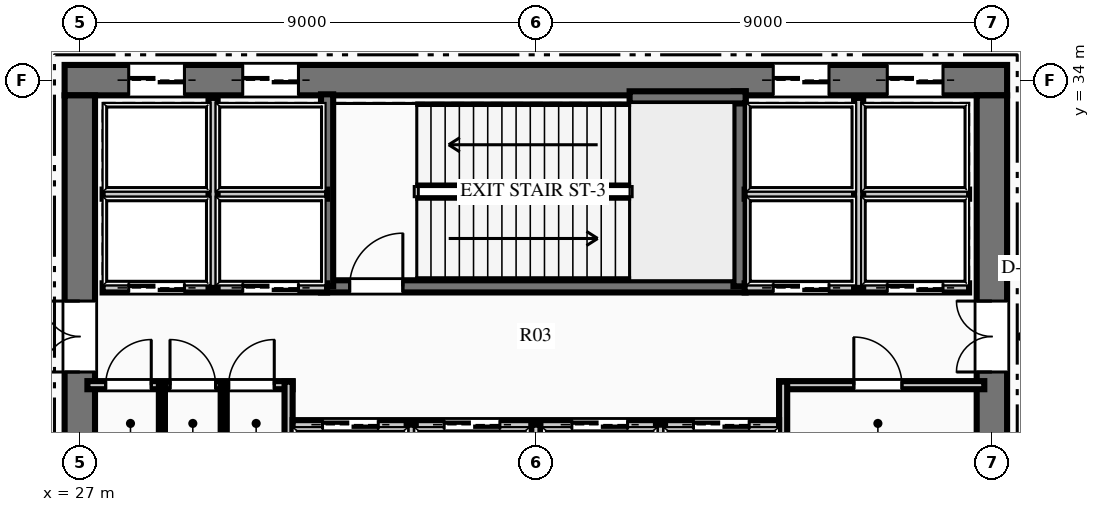
"""IFC4 building model, lengths in metres.
Left out: names, types, materials, properties, quantities, classifications, styles, units other than length and angle.
Written with IfcOpenShell. Run it as: python <this file> out.ifc"""

import sys

from ifc_helpers import new_model, si_unit, direction, frame, frame_2d, origin, place, context, subcontext, project, spatial, rectangle, extrude, element, fill, save


model = new_model("IFC4")
c1 = context("Model", 3, precision=1e-05, world=origin(), true_north=direction((0.0, 1.0)))
c2 = subcontext(c1, "Body", "Model", "MODEL_VIEW")
j1 = project(units=[si_unit("LENGTHUNIT", "METRE"), si_unit("PLANEANGLEUNIT", "RADIAN")], contexts=[c1])
p1 = place(None, origin())
s1 = spatial("IfcSite", under=j1, at=p1, CompositionType="ELEMENT")
p2 = place(p1, origin())
s2 = spatial("IfcBuilding", under=s1, at=p2, CompositionType="ELEMENT")
p3 = place(p2, frame((0.0, 0.0, 11.4)))
s3 = spatial("IfcBuildingStorey", under=s2, at=p3, CompositionType="ELEMENT", Elevation=11.4)
p4 = place(p3, frame((26.7, 34.0, 0.0), z_axis=(0.0, 0.0, 1.0), x_axis=(1.0, 0.0, 0.0)))
e1 = element("IfcWall", 1, at=p4, inside=s3, PredefinedType="SHEAR", context=c2, shape_type="SweptSolid", body=[
    extrude(rectangle(XDim=18.6, YDim=0.6, at=frame_2d((9.3, 0.0))), origin(), (0.0, 0.0, 1.0), 5.4),
])
p5 = place(p4, frame((1.265, 0.0, 0.0)))
e2 = element("IfcOpeningElement", 2, at=p5, cuts=e1, PredefinedType="OPENING", context=c2, shape_type="SweptSolid", body=[
    extrude(rectangle(XDim=1.1, YDim=2.15, at=frame_2d((0.55, 1.075))), frame((0.0, 0.31, 0.0), z_axis=(0.0, -1.0, 0.0), x_axis=(1.0, 0.0, 0.0)), (0.0, 0.0, 1.0), 0.62),
])
p6 = place(p4, frame((3.515, 0.0, 0.0)))
e3 = element("IfcOpeningElement", 3, at=p6, cuts=e1, PredefinedType="OPENING", context=c2, shape_type="SweptSolid", body=[
    extrude(rectangle(XDim=1.1, YDim=2.15, at=frame_2d((0.55, 1.075))), frame((0.0, 0.31, 0.0), z_axis=(0.0, -1.0, 0.0), x_axis=(1.0, 0.0, 0.0)), (0.0, 0.0, 1.0), 0.62),
])
p7 = place(p4, frame((13.985, 0.0, 0.0)))
e4 = element("IfcOpeningElement", 4, at=p7, cuts=e1, PredefinedType="OPENING", context=c2, shape_type="SweptSolid", body=[
    extrude(rectangle(XDim=1.1, YDim=2.15, at=frame_2d((0.55, 1.075))), frame((0.0, 0.31, 0.0), z_axis=(0.0, -1.0, 0.0), x_axis=(1.0, 0.0, 0.0)), (0.0, 0.0, 1.0), 0.62),
])
p8 = place(p4, frame((16.235, 0.0, 0.0)))
e5 = element("IfcOpeningElement", 5, at=p8, cuts=e1, PredefinedType="OPENING", context=c2, shape_type="SweptSolid", body=[
    extrude(rectangle(XDim=1.1, YDim=2.15, at=frame_2d((0.55, 1.075))), frame((0.0, 0.31, 0.0), z_axis=(0.0, -1.0, 0.0), x_axis=(1.0, 0.0, 0.0)), (0.0, 0.0, 1.0), 0.62),
])
p9 = place(p3, frame((27.0, 18.3, 0.0), z_axis=(0.0, 0.0, 1.0), x_axis=(0.0, 1.0, 0.0)))
e6 = element("IfcWall", 6, at=p9, inside=s3, PredefinedType="SHEAR", context=c2, shape_type="SweptSolid", body=[
    extrude(rectangle(XDim=15.4, YDim=0.6, at=frame_2d((7.7, 0.0))), origin(), (0.0, 0.0, 1.0), 5.4),
])
p10 = place(p9, frame((9.94, 0.0, 0.0)))
e7 = element("IfcOpeningElement", 7, at=p10, cuts=e6, PredefinedType="OPENING", context=c2, shape_type="SweptSolid", body=[
    extrude(rectangle(XDim=1.4, YDim=2.2, at=frame_2d((0.7, 1.1))), frame((0.0, 0.31, 0.0), z_axis=(0.0, -1.0, 0.0), x_axis=(1.0, 0.0, 0.0)), (0.0, 0.0, 1.0), 0.62),
])
p11 = place(p3, frame((45.0, 18.3, 0.0), z_axis=(0.0, 0.0, 1.0), x_axis=(0.0, 1.0, 0.0)))
e8 = element("IfcWall", 8, at=p11, inside=s3, PredefinedType="SHEAR", context=c2, shape_type="SweptSolid", body=[
    extrude(rectangle(XDim=15.4, YDim=0.6, at=frame_2d((7.7, 0.0))), origin(), (0.0, 0.0, 1.0), 5.4),
])
p12 = place(p11, frame((9.94, 0.0, 0.0)))
e9 = element("IfcOpeningElement", 9, at=p12, cuts=e8, PredefinedType="OPENING", context=c2, shape_type="SweptSolid", body=[
    extrude(rectangle(XDim=1.4, YDim=2.2, at=frame_2d((0.7, 1.1))), frame((0.0, 0.31, 0.0), z_axis=(0.0, -1.0, 0.0), x_axis=(1.0, 0.0, 0.0)), (0.0, 0.0, 1.0), 0.62),
])
p13 = place(p3, frame((31.76, 29.93, 0.0), z_axis=(0.0, 0.0, 1.0), x_axis=(1.0, 0.0, 0.0)))
e10 = element("IfcWall", 10, at=p13, inside=s3, PredefinedType="SHEAR", context=c2, shape_type="SweptSolid", body=[
    extrude(rectangle(XDim=8.38, YDim=0.24, at=frame_2d((4.19, 0.0))), origin(), (0.0, 0.0, 1.0), 5.4),
])
p14 = place(p13, frame((0.565, 0.0, 0.0)))
e11 = element("IfcOpeningElement", 11, at=p14, cuts=e10, PredefinedType="OPENING", context=c2, shape_type="SweptSolid", body=[
    extrude(rectangle(XDim=1.05, YDim=2.15, at=frame_2d((0.525, 1.075))), frame((0.0, 0.13, 0.0), z_axis=(0.0, -1.0, 0.0), x_axis=(1.0, 0.0, 0.0)), (0.0, 0.0, 1.0), 0.26),
])
p15 = place(p3, frame((31.88, 29.93, 0.0), z_axis=(0.0, 0.0, 1.0), x_axis=(0.0, 1.0, 0.0)))
e12 = element("IfcWall", 12, at=p15, inside=s3, PredefinedType="SHEAR", context=c2, shape_type="SweptSolid", body=[
    extrude(rectangle(XDim=3.79, YDim=0.24, at=frame_2d((1.895, 0.0))), origin(), (0.0, 0.0, 1.0), 5.4),
])
p16 = place(p3, frame((40.02, 29.93, 0.0), z_axis=(0.0, 0.0, 1.0), x_axis=(0.0, 1.0, 0.0)))
e13 = element("IfcWall", 13, at=p16, inside=s3, PredefinedType="SHEAR", context=c2, shape_type="SweptSolid", body=[
    extrude(rectangle(XDim=3.85, YDim=0.24, at=frame_2d((1.925, 0.0))), origin(), (0.0, 0.0, 1.0), 5.4),
])
p17 = place(p3, frame((37.85, 33.66, 0.0), z_axis=(0.0, 0.0, 1.0), x_axis=(1.0, 0.0, 0.0)))
e14 = element("IfcWall", 14, at=p17, inside=s3, PredefinedType="SHEAR", context=c2, shape_type="SweptSolid", body=[
    extrude(rectangle(XDim=2.29, YDim=0.24, at=frame_2d((1.145, 0.0))), origin(), (0.0, 0.0, 1.0), 5.4),
])
p18 = place(p3, frame((27.15, 27.98, 0.0), z_axis=(0.0, 0.0, 1.0), x_axis=(1.0, 0.0, 0.0)))
e15 = element("IfcWall", 15, at=p18, inside=s3, PredefinedType="PARTITIONING", context=c2, shape_type="SweptSolid", body=[
    extrude(rectangle(XDim=4.05, YDim=0.16, at=frame_2d((2.025, 0.0))), origin(), (0.0, 0.0, 1.0), 5.07),
])
p19 = place(p18, frame((0.36, 0.0, 0.0)))
e16 = element("IfcOpeningElement", 16, at=p19, cuts=e15, PredefinedType="OPENING", context=c2, shape_type="SweptSolid", body=[
    extrude(rectangle(XDim=0.9, YDim=2.15, at=frame_2d((0.45, 1.075))), frame((0.0, 0.09, 0.0), z_axis=(0.0, -1.0, 0.0), x_axis=(1.0, 0.0, 0.0)), (0.0, 0.0, 1.0), 0.18),
])
p20 = place(p18, frame((1.63, 0.0, 0.0)))
e17 = element("IfcOpeningElement", 17, at=p20, cuts=e15, PredefinedType="OPENING", context=c2, shape_type="SweptSolid", body=[
    extrude(rectangle(XDim=0.9, YDim=2.15, at=frame_2d((0.45, 1.075))), frame((0.0, 0.09, 0.0), z_axis=(0.0, -1.0, 0.0), x_axis=(1.0, 0.0, 0.0)), (0.0, 0.0, 1.0), 0.18),
])
p21 = place(p18, frame((2.788, 0.0, 0.0)))
e18 = element("IfcOpeningElement", 18, at=p21, cuts=e15, PredefinedType="OPENING", context=c2, shape_type="SweptSolid", body=[
    extrude(rectangle(XDim=0.9, YDim=2.15, at=frame_2d((0.45, 1.075))), frame((0.0, 0.09, 0.0), z_axis=(0.0, -1.0, 0.0), x_axis=(1.0, 0.0, 0.0)), (0.0, 0.0, 1.0), 0.18),
])
p22 = place(p3, frame((31.12, 26.54, 0.0), z_axis=(0.0, 0.0, 1.0), x_axis=(0.0, 1.0, 0.0)))
e19 = element("IfcWall", 19, at=p22, inside=s3, PredefinedType="PARTITIONING", context=c2, shape_type="SweptSolid", body=[
    extrude(rectangle(XDim=1.51, YDim=0.16, at=frame_2d((0.755, 0.0))), origin(), (0.0, 0.0, 1.0), 5.07),
])
p23 = place(p3, frame((40.8, 27.98, 0.0), z_axis=(0.0, 0.0, 1.0), x_axis=(1.0, 0.0, 0.0)))
e20 = element("IfcWall", 20, at=p23, inside=s3, PredefinedType="PARTITIONING", context=c2, shape_type="SweptSolid", body=[
    extrude(rectangle(XDim=4.05, YDim=0.16, at=frame_2d((2.025, 0.0))), origin(), (0.0, 0.0, 1.0), 5.07),
])
p24 = place(p23, frame((1.475, 0.0, 0.0)))
e21 = element("IfcOpeningElement", 21, at=p24, cuts=e20, PredefinedType="OPENING", context=c2, shape_type="SweptSolid", body=[
    extrude(rectangle(XDim=0.95, YDim=2.15, at=frame_2d((0.475, 1.075))), frame((0.0, 0.09, 0.0), z_axis=(0.0, -1.0, 0.0), x_axis=(1.0, 0.0, 0.0)), (0.0, 0.0, 1.0), 0.18),
])
p25 = place(p3, frame((40.88, 26.54, 0.0), z_axis=(0.0, 0.0, 1.0), x_axis=(0.0, 1.0, 0.0)))
e22 = element("IfcWall", 22, at=p25, inside=s3, PredefinedType="PARTITIONING", context=c2, shape_type="SweptSolid", body=[
    extrude(rectangle(XDim=1.51, YDim=0.16, at=frame_2d((0.755, 0.0))), origin(), (0.0, 0.0, 1.0), 5.07),
])
for number, where, z_axis, x_axis in (
    (23, (28.62, 26.54, 0.0), (0.0, 0.0, 1.0), (0.0, 1.0, 0.0)),
    (24, (29.84, 26.54, 0.0), (0.0, 0.0, 1.0), (0.0, 1.0, 0.0)),
):
    element("IfcWall", number, at=place(p3, frame(where, z_axis=z_axis, x_axis=x_axis)), inside=s3, PredefinedType="PARTITIONING", context=c2, shape_type="SweptSolid", body=[
        extrude(rectangle(XDim=1.44, YDim=0.12, at=frame_2d((0.72, 0.0))), origin(), (0.0, 0.0, 1.0), 5.07),
    ])
p26 = place(p3, frame((27.45, 29.9, 0.0), z_axis=(0.0, 0.0, 1.0), x_axis=(1.0, 0.0, 0.0)))
e25 = element("IfcWall", 25, at=p26, inside=s3, PredefinedType="PARTITIONING", context=c2, shape_type="SweptSolid", body=[
    extrude(rectangle(XDim=4.43, YDim=0.18, at=frame_2d((2.215, 0.0))), origin(), (0.0, 0.0, 1.0), 5.07),
])
p27 = place(p26, frame((0.515, 0.0, 0.0)))
e26 = element("IfcOpeningElement", 26, at=p27, cuts=e25, PredefinedType="OPENING", context=c2, shape_type="SweptSolid", body=[
    extrude(rectangle(XDim=1.1, YDim=2.15, at=frame_2d((0.55, 1.075))), frame((0.0, 0.1, 0.0), z_axis=(0.0, -1.0, 0.0), x_axis=(1.0, 0.0, 0.0)), (0.0, 0.0, 1.0), 0.2),
])
p28 = place(p26, frame((2.765, 0.0, 0.0)))
e27 = element("IfcOpeningElement", 27, at=p28, cuts=e25, PredefinedType="OPENING", context=c2, shape_type="SweptSolid", body=[
    extrude(rectangle(XDim=1.1, YDim=2.15, at=frame_2d((0.55, 1.075))), frame((0.0, 0.1, 0.0), z_axis=(0.0, -1.0, 0.0), x_axis=(1.0, 0.0, 0.0)), (0.0, 0.0, 1.0), 0.2),
])
p29 = place(p3, frame((27.45, 31.75, 0.0), z_axis=(0.0, 0.0, 1.0), x_axis=(1.0, 0.0, 0.0)))
e28 = element("IfcWall", 28, at=p29, inside=s3, PredefinedType="PARTITIONING", context=c2, shape_type="SweptSolid", body=[
    extrude(rectangle(XDim=4.43, YDim=0.18, at=frame_2d((2.215, 0.0))), origin(), (0.0, 0.0, 1.0), 5.07),
])
p30 = place(p3, frame((29.63, 29.9, 0.0), z_axis=(0.0, 0.0, 1.0), x_axis=(0.0, 1.0, 0.0)))
e29 = element("IfcWall", 29, at=p30, inside=s3, PredefinedType="PARTITIONING", context=c2, shape_type="SweptSolid", body=[
    extrude(rectangle(XDim=3.75, YDim=0.18, at=frame_2d((1.875, 0.0))), origin(), (0.0, 0.0, 1.0), 5.07),
])
p31 = place(p3, frame((40.12, 29.9, 0.0), z_axis=(0.0, 0.0, 1.0), x_axis=(1.0, 0.0, 0.0)))
e30 = element("IfcWall", 30, at=p31, inside=s3, PredefinedType="PARTITIONING", context=c2, shape_type="SweptSolid", body=[
    extrude(rectangle(XDim=4.43, YDim=0.18, at=frame_2d((2.215, 0.0))), origin(), (0.0, 0.0, 1.0), 5.07),
])
p32 = place(p31, frame((0.565, 0.0, 0.0)))
e31 = element("IfcOpeningElement", 31, at=p32, cuts=e30, PredefinedType="OPENING", context=c2, shape_type="SweptSolid", body=[
    extrude(rectangle(XDim=1.1, YDim=2.15, at=frame_2d((0.55, 1.075))), frame((0.0, 0.1, 0.0), z_axis=(0.0, -1.0, 0.0), x_axis=(1.0, 0.0, 0.0)), (0.0, 0.0, 1.0), 0.2),
])
p33 = place(p31, frame((2.815, 0.0, 0.0)))
e32 = element("IfcOpeningElement", 32, at=p33, cuts=e30, PredefinedType="OPENING", context=c2, shape_type="SweptSolid", body=[
    extrude(rectangle(XDim=1.1, YDim=2.15, at=frame_2d((0.55, 1.075))), frame((0.0, 0.1, 0.0), z_axis=(0.0, -1.0, 0.0), x_axis=(1.0, 0.0, 0.0)), (0.0, 0.0, 1.0), 0.2),
])
p34 = place(p3, frame((40.12, 31.75, 0.0), z_axis=(0.0, 0.0, 1.0), x_axis=(1.0, 0.0, 0.0)))
e33 = element("IfcWall", 33, at=p34, inside=s3, PredefinedType="PARTITIONING", context=c2, shape_type="SweptSolid", body=[
    extrude(rectangle(XDim=4.43, YDim=0.18, at=frame_2d((2.215, 0.0))), origin(), (0.0, 0.0, 1.0), 5.07),
])
p35 = place(p3, frame((42.37, 29.9, 0.0), z_axis=(0.0, 0.0, 1.0), x_axis=(0.0, 1.0, 0.0)))
e34 = element("IfcWall", 34, at=p35, inside=s3, PredefinedType="PARTITIONING", context=c2, shape_type="SweptSolid", body=[
    extrude(rectangle(XDim=3.75, YDim=0.18, at=frame_2d((1.875, 0.0))), origin(), (0.0, 0.0, 1.0), 5.07),
])
p36 = place(p3, frame((31.2, 27.2, 0.0), z_axis=(0.0, 0.0, 1.0), x_axis=(1.0, 0.0, 0.0)))
e35 = element("IfcWall", 35, at=p36, inside=s3, PredefinedType="PARTITIONING", context=c2, shape_type="SweptSolid", body=[
    extrude(rectangle(XDim=9.6, YDim=0.18, at=frame_2d((4.8, 0.0))), origin(), (0.0, 0.0, 1.0), 5.07),
])
p37 = place(p36, frame((0.59, 0.0, 0.0)))
e36 = element("IfcOpeningElement", 36, at=p37, cuts=e35, PredefinedType="OPENING", context=c2, shape_type="SweptSolid", body=[
    extrude(rectangle(XDim=1.1, YDim=2.15, at=frame_2d((0.55, 1.075))), frame((0.0, 0.1, 0.0), z_axis=(0.0, -1.0, 0.0), x_axis=(1.0, 0.0, 0.0)), (0.0, 0.0, 1.0), 0.2),
])
p38 = place(p36, frame((2.99, 0.0, 0.0)))
e37 = element("IfcOpeningElement", 37, at=p38, cuts=e35, PredefinedType="OPENING", context=c2, shape_type="SweptSolid", body=[
    extrude(rectangle(XDim=1.1, YDim=2.15, at=frame_2d((0.55, 1.075))), frame((0.0, 0.1, 0.0), z_axis=(0.0, -1.0, 0.0), x_axis=(1.0, 0.0, 0.0)), (0.0, 0.0, 1.0), 0.2),
])
p39 = place(p36, frame((5.51, 0.0, 0.0)))
e38 = element("IfcOpeningElement", 38, at=p39, cuts=e35, PredefinedType="OPENING", context=c2, shape_type="SweptSolid", body=[
    extrude(rectangle(XDim=1.1, YDim=2.15, at=frame_2d((0.55, 1.075))), frame((0.0, 0.1, 0.0), z_axis=(0.0, -1.0, 0.0), x_axis=(1.0, 0.0, 0.0)), (0.0, 0.0, 1.0), 0.2),
])
p40 = place(p36, frame((7.91, 0.0, 0.0)))
e39 = element("IfcOpeningElement", 39, at=p40, cuts=e35, PredefinedType="OPENING", context=c2, shape_type="SweptSolid", body=[
    extrude(rectangle(XDim=1.1, YDim=2.15, at=frame_2d((0.55, 1.075))), frame((0.0, 0.1, 0.0), z_axis=(0.0, -1.0, 0.0), x_axis=(1.0, 0.0, 0.0)), (0.0, 0.0, 1.0), 0.2),
])
for number, where, z_axis, x_axis in (
    (40, (33.54, 25.3, 0.0), (0.0, 0.0, 1.0), (0.0, 1.0, 0.0)),
    (41, (36.0, 25.3, 0.0), (0.0, 0.0, 1.0), (0.0, 1.0, 0.0)),
    (42, (38.46, 25.3, 0.0), (0.0, 0.0, 1.0), (0.0, 1.0, 0.0)),
):
    element("IfcWall", number, at=place(p3, frame(where, z_axis=z_axis, x_axis=x_axis)), inside=s3, PredefinedType="PARTITIONING", context=c2, shape_type="SweptSolid", body=[
        extrude(rectangle(XDim=1.9, YDim=0.18, at=frame_2d((0.95, 0.0))), origin(), (0.0, 0.0, 1.0), 5.07),
    ])
p41 = place(p19, origin())
e43 = element("IfcDoor", 43, at=p41, inside=s3, OperationType="SINGLE_SWING_RIGHT", PredefinedType="DOOR", context=c2, shape_type="SweptSolid", body=[
    extrude(rectangle(XDim=0.9, YDim=2.15, at=frame_2d((0.45, 1.075))), frame((0.0, 0.025, 0.0), z_axis=(0.0, -1.0, 0.0), x_axis=(1.0, 0.0, 0.0)), (0.0, 0.0, 1.0), 0.05),
])
fill(e16, e43)
p42 = place(p20, origin())
e44 = element("IfcDoor", 44, at=p42, inside=s3, OperationType="SINGLE_SWING_LEFT", PredefinedType="DOOR", context=c2, shape_type="SweptSolid", body=[
    extrude(rectangle(XDim=0.9, YDim=2.15, at=frame_2d((0.45, 1.075))), frame((0.0, 0.025, 0.0), z_axis=(0.0, -1.0, 0.0), x_axis=(1.0, 0.0, 0.0)), (0.0, 0.0, 1.0), 0.05),
])
fill(e17, e44)
p43 = place(p21, origin())
e45 = element("IfcDoor", 45, at=p43, inside=s3, OperationType="SINGLE_SWING_RIGHT", PredefinedType="DOOR", context=c2, shape_type="SweptSolid", body=[
    extrude(rectangle(XDim=0.9, YDim=2.15, at=frame_2d((0.45, 1.075))), frame((0.0, 0.025, 0.0), z_axis=(0.0, -1.0, 0.0), x_axis=(1.0, 0.0, 0.0)), (0.0, 0.0, 1.0), 0.05),
])
fill(e18, e45)
p44 = place(p24, origin())
e46 = element("IfcDoor", 46, at=p44, inside=s3, OperationType="SINGLE_SWING_LEFT", PredefinedType="DOOR", context=c2, shape_type="SweptSolid", body=[
    extrude(rectangle(XDim=0.95, YDim=2.15, at=frame_2d((0.475, 1.075))), frame((0.0, 0.025, 0.0), z_axis=(0.0, -1.0, 0.0), x_axis=(1.0, 0.0, 0.0)), (0.0, 0.0, 1.0), 0.05),
])
fill(e21, e46)
p45 = place(p14, origin())
e47 = element("IfcDoor", 47, at=p45, inside=s3, OperationType="SINGLE_SWING_RIGHT", PredefinedType="DOOR", context=c2, shape_type="SweptSolid", body=[
    extrude(rectangle(XDim=1.05, YDim=2.15, at=frame_2d((0.525, 1.075))), frame((0.0, 0.025, 0.0), z_axis=(0.0, -1.0, 0.0), x_axis=(1.0, 0.0, 0.0)), (0.0, 0.0, 1.0), 0.05),
])
fill(e11, e47)
p46 = place(p10, origin())
e48 = element("IfcDoor", 48, at=p46, inside=s3, OperationType="DOUBLE_DOOR_SINGLE_SWING", PredefinedType="DOOR", context=c2, shape_type="SweptSolid", body=[
    extrude(rectangle(XDim=1.4, YDim=2.2, at=frame_2d((0.7, 1.1))), frame((0.0, 0.025, 0.0), z_axis=(0.0, -1.0, 0.0), x_axis=(1.0, 0.0, 0.0)), (0.0, 0.0, 1.0), 0.05),
])
fill(e7, e48)
p47 = place(p12, origin())
e49 = element("IfcDoor", 49, at=p47, inside=s3, OperationType="DOUBLE_DOOR_SINGLE_SWING", PredefinedType="DOOR", context=c2, shape_type="SweptSolid", body=[
    extrude(rectangle(XDim=1.4, YDim=2.2, at=frame_2d((0.7, 1.1))), frame((0.0, 0.025, 0.0), z_axis=(0.0, -1.0, 0.0), x_axis=(1.0, 0.0, 0.0)), (0.0, 0.0, 1.0), 0.05),
])
fill(e9, e49)
p48 = place(p27, origin())
e50 = element("IfcDoor", 50, at=p48, inside=s3, OperationType="SLIDING_TO_LEFT", PredefinedType="DOOR", context=c2, shape_type="SweptSolid", body=[
    extrude(rectangle(XDim=1.1, YDim=2.15, at=frame_2d((0.55, 1.075))), frame((0.0, 0.025, 0.0), z_axis=(0.0, -1.0, 0.0), x_axis=(1.0, 0.0, 0.0)), (0.0, 0.0, 1.0), 0.05),
])
fill(e26, e50)
p49 = place(p28, origin())
e51 = element("IfcDoor", 51, at=p49, inside=s3, OperationType="SLIDING_TO_LEFT", PredefinedType="DOOR", context=c2, shape_type="SweptSolid", body=[
    extrude(rectangle(XDim=1.1, YDim=2.15, at=frame_2d((0.55, 1.075))), frame((0.0, 0.025, 0.0), z_axis=(0.0, -1.0, 0.0), x_axis=(1.0, 0.0, 0.0)), (0.0, 0.0, 1.0), 0.05),
])
fill(e27, e51)
p50 = place(p5, origin())
e52 = element("IfcDoor", 52, at=p50, inside=s3, OperationType="SLIDING_TO_LEFT", PredefinedType="DOOR", context=c2, shape_type="SweptSolid", body=[
    extrude(rectangle(XDim=1.1, YDim=2.15, at=frame_2d((0.55, 1.075))), frame((0.0, 0.025, 0.0), z_axis=(0.0, -1.0, 0.0), x_axis=(1.0, 0.0, 0.0)), (0.0, 0.0, 1.0), 0.05),
])
fill(e2, e52)
p51 = place(p6, origin())
e53 = element("IfcDoor", 53, at=p51, inside=s3, OperationType="SLIDING_TO_LEFT", PredefinedType="DOOR", context=c2, shape_type="SweptSolid", body=[
    extrude(rectangle(XDim=1.1, YDim=2.15, at=frame_2d((0.55, 1.075))), frame((0.0, 0.025, 0.0), z_axis=(0.0, -1.0, 0.0), x_axis=(1.0, 0.0, 0.0)), (0.0, 0.0, 1.0), 0.05),
])
fill(e3, e53)
p52 = place(p32, origin())
e54 = element("IfcDoor", 54, at=p52, inside=s3, OperationType="SLIDING_TO_LEFT", PredefinedType="DOOR", context=c2, shape_type="SweptSolid", body=[
    extrude(rectangle(XDim=1.1, YDim=2.15, at=frame_2d((0.55, 1.075))), frame((0.0, 0.025, 0.0), z_axis=(0.0, -1.0, 0.0), x_axis=(1.0, 0.0, 0.0)), (0.0, 0.0, 1.0), 0.05),
])
fill(e31, e54)
p53 = place(p33, origin())
e55 = element("IfcDoor", 55, at=p53, inside=s3, OperationType="SLIDING_TO_LEFT", PredefinedType="DOOR", context=c2, shape_type="SweptSolid", body=[
    extrude(rectangle(XDim=1.1, YDim=2.15, at=frame_2d((0.55, 1.075))), frame((0.0, 0.025, 0.0), z_axis=(0.0, -1.0, 0.0), x_axis=(1.0, 0.0, 0.0)), (0.0, 0.0, 1.0), 0.05),
])
fill(e32, e55)
p54 = place(p7, origin())
e56 = element("IfcDoor", 56, at=p54, inside=s3, OperationType="SLIDING_TO_LEFT", PredefinedType="DOOR", context=c2, shape_type="SweptSolid", body=[
    extrude(rectangle(XDim=1.1, YDim=2.15, at=frame_2d((0.55, 1.075))), frame((0.0, 0.025, 0.0), z_axis=(0.0, -1.0, 0.0), x_axis=(1.0, 0.0, 0.0)), (0.0, 0.0, 1.0), 0.05),
])
fill(e4, e56)
p55 = place(p8, origin())
e57 = element("IfcDoor", 57, at=p55, inside=s3, OperationType="SLIDING_TO_LEFT", PredefinedType="DOOR", context=c2, shape_type="SweptSolid", body=[
    extrude(rectangle(XDim=1.1, YDim=2.15, at=frame_2d((0.55, 1.075))), frame((0.0, 0.025, 0.0), z_axis=(0.0, -1.0, 0.0), x_axis=(1.0, 0.0, 0.0)), (0.0, 0.0, 1.0), 0.05),
])
fill(e5, e57)
p56 = place(p37, origin())
e58 = element("IfcDoor", 58, at=p56, inside=s3, OperationType="SLIDING_TO_LEFT", PredefinedType="DOOR", context=c2, shape_type="SweptSolid", body=[
    extrude(rectangle(XDim=1.1, YDim=2.15, at=frame_2d((0.55, 1.075))), frame((0.0, 0.025, 0.0), z_axis=(0.0, -1.0, 0.0), x_axis=(1.0, 0.0, 0.0)), (0.0, 0.0, 1.0), 0.05),
])
fill(e36, e58)
p57 = place(p38, origin())
e59 = element("IfcDoor", 59, at=p57, inside=s3, OperationType="SLIDING_TO_LEFT", PredefinedType="DOOR", context=c2, shape_type="SweptSolid", body=[
    extrude(rectangle(XDim=1.1, YDim=2.15, at=frame_2d((0.55, 1.075))), frame((0.0, 0.025, 0.0), z_axis=(0.0, -1.0, 0.0), x_axis=(1.0, 0.0, 0.0)), (0.0, 0.0, 1.0), 0.05),
])
fill(e37, e59)
p58 = place(p39, origin())
e60 = element("IfcDoor", 60, at=p58, inside=s3, OperationType="SLIDING_TO_LEFT", PredefinedType="DOOR", context=c2, shape_type="SweptSolid", body=[
    extrude(rectangle(XDim=1.1, YDim=2.15, at=frame_2d((0.55, 1.075))), frame((0.0, 0.025, 0.0), z_axis=(0.0, -1.0, 0.0), x_axis=(1.0, 0.0, 0.0)), (0.0, 0.0, 1.0), 0.05),
])
fill(e38, e60)
p59 = place(p40, origin())
e61 = element("IfcDoor", 61, at=p59, inside=s3, OperationType="SLIDING_TO_LEFT", PredefinedType="DOOR", context=c2, shape_type="SweptSolid", body=[
    extrude(rectangle(XDim=1.1, YDim=2.15, at=frame_2d((0.55, 1.075))), frame((0.0, 0.025, 0.0), z_axis=(0.0, -1.0, 0.0), x_axis=(1.0, 0.0, 0.0)), (0.0, 0.0, 1.0), 0.05),
])
fill(e39, e61)
save(model, sys.argv[1])
